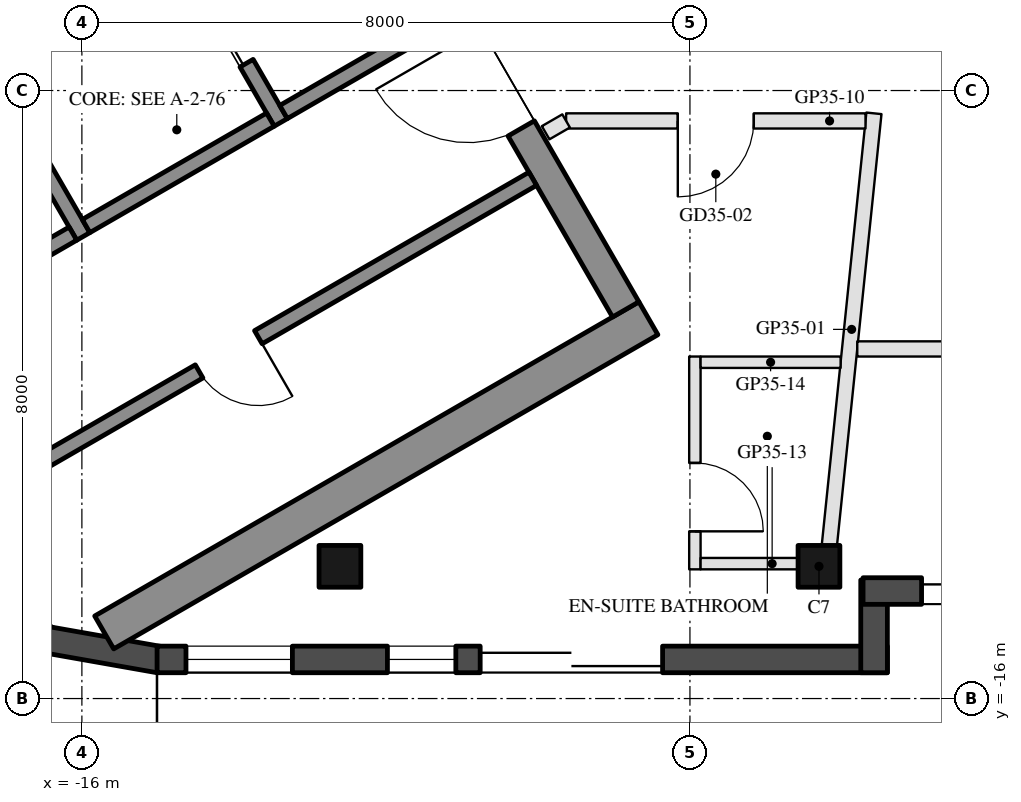
"""IFC4 building model, lengths in metres.
Left out: names, types, materials, properties, quantities, classifications, styles, units other than length and angle.
Written with IfcOpenShell. Run it as: python <this file> out.ifc"""

import sys

from ifc_helpers import new_model, si_unit, direction, frame, frame_2d, origin, origin_2d, place, context, subcontext, project, spatial, rectangle, hollow_rectangle, extrude, boolean, halfspace, element, fill, save


model = new_model("IFC4")
c1 = context("Model", 3, precision=1e-05, world=origin(), true_north=direction((0.0, 1.0)))
c2 = subcontext(c1, "Body", "Model", "MODEL_VIEW")
j1 = project(units=[si_unit("LENGTHUNIT", "METRE"), si_unit("PLANEANGLEUNIT", "RADIAN")], contexts=[c1])
p1 = place(None, origin())
s1 = spatial("IfcSite", under=j1, at=p1, CompositionType="ELEMENT")
p2 = place(p1, origin())
s2 = spatial("IfcBuilding", under=s1, at=p2, CompositionType="ELEMENT")
p3 = place(p2, frame((0.0, 0.0, 324.4)))
s3 = spatial("IfcBuildingStorey", under=s2, at=p3, CompositionType="ELEMENT", Elevation=324.4)
p4 = place(p3, frame((-12.605, -14.26, 0.0), z_axis=(0.0, 0.0, 1.0), x_axis=(-1.0, 0.0, 0.0)))
e1 = element("IfcColumn", 1, at=p4, inside=s3, PredefinedType="COLUMN", context=c2, shape_type="SweptSolid", body=[
    boolean("DIFFERENCE", boolean("DIFFERENCE", extrude(hollow_rectangle(XDim=0.55, YDim=0.55, WallThickness=0.025, at=origin_2d()), origin(), (0.0, 0.0, 1.0), 3.7), halfspace(frame((0.0, 0.0, 0.04), z_axis=(0.0, 0.0, 1.0), x_axis=(1.0, 0.0, 0.0)), True)), halfspace(frame((0.0, 0.0, 3.66), z_axis=(0.0, 0.0, 1.0), x_axis=(1.0, 0.0, 0.0)), False)),
])
p5 = place(p3, frame((-6.302, -14.26, 0.0), z_axis=(0.0, 0.0, 1.0), x_axis=(-1.0, 0.0, 0.0)))
e2 = element("IfcColumn", 2, at=p5, inside=s3, PredefinedType="COLUMN", context=c2, shape_type="SweptSolid", body=[
    boolean("DIFFERENCE", boolean("DIFFERENCE", extrude(hollow_rectangle(XDim=0.55, YDim=0.55, WallThickness=0.025, at=origin_2d()), origin(), (0.0, 0.0, 1.0), 3.7), halfspace(frame((0.0, 0.0, 0.034), z_axis=(0.0, 0.0, 1.0), x_axis=(1.0, 0.0, 0.0)), True)), halfspace(frame((0.0, 0.0, 3.666), z_axis=(0.0, 0.0, 1.0), x_axis=(1.0, 0.0, 0.0)), False)),
])
for number, where, z_axis, x_axis in (
    (3, (-17.744, -14.482, 0.0), (0.0, 0.0, 1.0), (0.866, -0.5, 0.0)),
    (4, (-16.481, -15.223, 0.0), (0.0, 0.0, 1.0), (0.985, -0.174, 0.0)),
):
    element("IfcWall", number, at=place(p3, frame(where, z_axis=z_axis, x_axis=x_axis)), inside=s3, PredefinedType="SOLIDWALL", context=c2, shape_type="SweptSolid", body=[
        extrude(rectangle(XDim=1.524, YDim=0.35, at=frame_2d((0.762, 0.0))), origin(), (0.0, 0.0, 1.0), 3.55),
    ])
p6 = place(p3, frame((-15.011, -15.485, 0.0), z_axis=(0.0, 0.0, 1.0), x_axis=(1.0, 0.0, 0.0)))
e5 = element("IfcWall", 5, at=p6, inside=s3, PredefinedType="SOLIDWALL", context=c2, shape_type="SweptSolid", body=[
    extrude(rectangle(XDim=9.608, YDim=0.35, at=frame_2d((4.804, 0.0))), origin(), (0.0, 0.0, 1.0), 3.55),
])
p7 = place(p6, frame((0.38, 0.0, 0.3)))
e6 = element("IfcOpeningElement", 6, at=p7, cuts=e5, PredefinedType="OPENING", context=c2, shape_type="SweptSolid", body=[
    extrude(rectangle(XDim=1.4, YDim=2.65, at=frame_2d((0.7, 1.325))), frame((0.0, 0.185, 0.0), z_axis=(0.0, -1.0, 0.0), x_axis=(1.0, 0.0, 0.0)), (0.0, 0.0, 1.0), 0.37),
])
p8 = place(p6, frame((4.251, 0.0, 0.0)))
e7 = element("IfcOpeningElement", 7, at=p8, cuts=e5, PredefinedType="OPENING", context=c2, shape_type="SweptSolid", body=[
    extrude(rectangle(XDim=2.4, YDim=2.4, at=frame_2d((1.2, 1.2))), frame((0.0, 0.185, 0.0), z_axis=(0.0, -1.0, 0.0), x_axis=(1.0, 0.0, 0.0)), (0.0, 0.0, 1.0), 0.37),
])
p9 = place(p6, frame((3.031, 0.0, 0.3)))
e8 = element("IfcOpeningElement", 8, at=p9, cuts=e5, PredefinedType="OPENING", context=c2, shape_type="SweptSolid", body=[
    extrude(rectangle(XDim=0.9, YDim=2.65, at=frame_2d((0.45, 1.325))), frame((0.0, 0.185, 0.0), z_axis=(0.0, -1.0, 0.0), x_axis=(1.0, 0.0, 0.0)), (0.0, 0.0, 1.0), 0.37),
])
p10 = place(p3, frame((-5.577, -15.66, 0.0), z_axis=(0.0, 0.0, 1.0), x_axis=(0.0, 1.0, 0.0)))
e9 = element("IfcWall", 9, at=p10, inside=s3, PredefinedType="SOLIDWALL", context=c2, shape_type="SweptSolid", body=[
    extrude(rectangle(XDim=1.22, YDim=0.35, at=frame_2d((0.61, 0.0))), origin(), (0.0, 0.0, 1.0), 3.55),
])
p11 = place(p3, frame((-5.722, -14.585, 0.0), z_axis=(0.0, 0.0, 1.0), x_axis=(1.0, 0.0, 0.0)))
e10 = element("IfcWall", 10, at=p11, inside=s3, PredefinedType="SOLIDWALL", context=c2, shape_type="SweptSolid", body=[
    extrude(rectangle(XDim=5.142, YDim=0.35, at=frame_2d((2.571, 0.0))), origin(), (0.0, 0.0, 1.0), 3.55),
])
p12 = place(p11, frame((0.77, 0.0, 0.0)))
e11 = element("IfcOpeningElement", 11, at=p12, cuts=e10, PredefinedType="OPENING", context=c2, shape_type="SweptSolid", body=[
    extrude(rectangle(XDim=2.4, YDim=2.4, at=frame_2d((1.2, 1.2))), frame((0.0, 0.185, 0.0), z_axis=(0.0, -1.0, 0.0), x_axis=(1.0, 0.0, 0.0)), (0.0, 0.0, 1.0), 0.37),
])
p13 = place(p11, frame((3.47, 0.0, 0.3)))
e12 = element("IfcOpeningElement", 12, at=p13, cuts=e10, PredefinedType="OPENING", context=c2, shape_type="SweptSolid", body=[
    extrude(rectangle(XDim=0.9, YDim=2.65, at=frame_2d((0.45, 1.325))), frame((0.0, 0.185, 0.0), z_axis=(0.0, -1.0, 0.0), x_axis=(1.0, 0.0, 0.0)), (0.0, 0.0, 1.0), 0.37),
])
p14 = place(p3, frame((-8.547, -10.997, 0.0), z_axis=(0.0, 0.0, 1.0), x_axis=(-0.866030186143, -0.49999171662, 0.0)))
e13 = element("IfcWall", 13, at=p14, inside=s3, PredefinedType="SHEAR", context=c2, shape_type="SweptSolid", body=[
    extrude(rectangle(XDim=8.267, YDim=0.5, at=frame_2d((4.134, 0.0))), origin(), (0.0, 0.0, 1.0), 3.5),
])
p15 = place(p3, frame((-13.845, -2.22, 0.0), z_axis=(0.0, 0.0, 1.0), x_axis=(0.500004234368, -0.866022959057, 0.0)))
e14 = element("IfcWall", 14, at=p15, inside=s3, PredefinedType="SHEAR", context=c2, shape_type="SweptSolid", body=[
    extrude(rectangle(XDim=10.0, YDim=0.4, at=frame_2d((5.0, 0.0))), origin(), (0.0, 0.0, 1.0), 3.5),
])
p16 = place(p15, frame((3.55, 0.0, 0.0)))
e15 = element("IfcOpeningElement", 15, at=p16, cuts=e14, PredefinedType="OPENING", context=c2, shape_type="SweptSolid", body=[
    extrude(rectangle(XDim=1.1, YDim=2.1, at=frame_2d((0.55, 1.05))), frame((0.0, 0.21, 0.0), z_axis=(0.0, -1.0, 0.0), x_axis=(1.0, 0.0, 0.0)), (0.0, 0.0, 1.0), 0.42),
])
p17 = place(p15, frame((5.85, 0.0, 0.0)))
e16 = element("IfcOpeningElement", 16, at=p17, cuts=e14, PredefinedType="OPENING", context=c2, shape_type="SweptSolid", body=[
    extrude(rectangle(XDim=1.4, YDim=2.1, at=frame_2d((0.7, 1.05))), frame((0.0, 0.21, 0.0), z_axis=(0.0, -1.0, 0.0), x_axis=(1.0, 0.0, 0.0)), (0.0, 0.0, 1.0), 0.42),
])
p18 = place(p3, frame((-12.681, -4.636, 0.0), z_axis=(0.0, 0.0, 1.0), x_axis=(-0.866021702275, -0.500006411147, 0.0)))
e17 = element("IfcWall", 17, at=p18, inside=s3, PredefinedType="SHEAR", context=c2, shape_type="SweptSolid", body=[
    extrude(rectangle(XDim=6.45, YDim=0.25, at=frame_2d((3.225, 0.0))), origin(), (0.0, 0.0, 1.0), 3.5),
])
p19 = place(p18, frame((0.3, 0.0, 0.0)))
e18 = element("IfcOpeningElement", 18, at=p19, cuts=e17, PredefinedType="OPENING", context=c2, shape_type="SweptSolid", body=[
    extrude(rectangle(XDim=1.0, YDim=2.1, at=frame_2d((0.5, 1.05))), frame((0.0, 0.135, 0.0), z_axis=(0.0, -1.0, 0.0), x_axis=(1.0, 0.0, 0.0)), (0.0, 0.0, 1.0), 0.27),
])
p20 = place(p3, frame((-17.381, -7.495, 0.0), z_axis=(0.0, 0.0, 1.0), x_axis=(0.500011755427, -0.866018616679, 0.0)))
e19 = element("IfcWall", 19, at=p20, inside=s3, PredefinedType="SHEAR", context=c2, shape_type="SweptSolid", body=[
    extrude(rectangle(XDim=2.8, YDim=0.2, at=frame_2d((1.4, 0.0))), origin(), (0.0, 0.0, 1.0), 3.5),
])
p21 = place(p3, frame((-14.783, -5.995, 0.0), z_axis=(0.0, 0.0, 1.0), x_axis=(0.49994636267, -0.866056369097, 0.0)))
e20 = element("IfcWall", 20, at=p21, inside=s3, PredefinedType="SHEAR", context=c2, shape_type="SweptSolid", body=[
    extrude(rectangle(XDim=2.8, YDim=0.2, at=frame_2d((1.4, 0.0))), origin(), (0.0, 0.0, 1.0), 3.5),
])
p22 = place(p21, frame((0.7, 0.0, 0.0)))
e21 = element("IfcOpeningElement", 21, at=p22, cuts=e20, PredefinedType="OPENING", context=c2, shape_type="SweptSolid", body=[
    extrude(rectangle(XDim=1.2, YDim=2.1, at=frame_2d((0.6, 1.05))), frame((0.0, 0.11, 0.0), z_axis=(0.0, -1.0, 0.0), x_axis=(1.0, 0.0, 0.0)), (0.0, 0.0, 1.0), 0.22),
])
p23 = place(p3, frame((-13.52, -8.383, 0.0), z_axis=(0.0, 0.0, 1.0), x_axis=(-0.866034573852, -0.49998411664, 0.0)))
e22 = element("IfcWall", 22, at=p23, inside=s3, PredefinedType="SHEAR", context=c2, shape_type="SweptSolid", body=[
    extrude(rectangle(XDim=2.8, YDim=0.2, at=frame_2d((1.4, 0.0))), origin(), (0.0, 0.0, 1.0), 3.5),
])
p24 = place(p3, frame((-11.268, -7.083, 0.0), z_axis=(0.0, 0.0, 1.0), x_axis=(-0.866050077142, -0.499957262057, 0.0)))
e23 = element("IfcWall", 23, at=p24, inside=s3, PredefinedType="SHEAR", context=c2, shape_type="SweptSolid", body=[
    extrude(rectangle(XDim=2.4, YDim=0.2, at=frame_2d((1.2, 0.0))), origin(), (0.0, 0.0, 1.0), 3.5),
])
p25 = place(p3, frame((-10.068, -9.162, 0.0), z_axis=(0.0, 0.0, 1.0), x_axis=(-0.866027741594, -0.499995950774, 0.0)))
e24 = element("IfcWall", 24, at=p25, inside=s3, PredefinedType="SHEAR", context=c2, shape_type="SweptSolid", body=[
    extrude(rectangle(XDim=9.272, YDim=0.2, at=frame_2d((4.636, 0.0))), origin(), (0.0, 0.0, 1.0), 3.5),
])
p26 = place(p25, frame((4.169, 0.0, 0.0)))
e25 = element("IfcOpeningElement", 25, at=p26, cuts=e24, PredefinedType="OPENING", context=c2, shape_type="SweptSolid", body=[
    extrude(rectangle(XDim=0.9, YDim=2.1, at=frame_2d((0.45, 1.05))), frame((0.0, 0.11, 0.0), z_axis=(0.0, -1.0, 0.0), x_axis=(1.0, 0.0, 0.0)), (0.0, 0.0, 1.0), 0.22),
])
p27 = place(p3, frame((-16.118, -9.883, 0.0), z_axis=(0.0, 0.0, 1.0), x_axis=(-0.86600680221, -0.500032217487, 0.0)))
e26 = element("IfcWall", 26, at=p27, inside=s3, PredefinedType="SHEAR", context=c2, shape_type="SweptSolid", body=[
    extrude(rectangle(XDim=1.774, YDim=0.2, at=frame_2d((0.887, 0.0))), origin(), (0.0, 0.0, 1.0), 3.5),
])
p28 = place(p3, frame((-6.166, -13.985, 0.0), z_axis=(0.0, 0.0, 1.0), x_axis=(0.102603302072, 0.994722354431, 0.0)))
e27 = element("IfcWall", 27, at=p28, inside=s3, PredefinedType="PARTITIONING", context=c2, shape_type="SweptSolid", body=[
    extrude(rectangle(XDim=5.716, YDim=0.2, at=frame_2d((2.858, 0.0))), origin(), (0.0, 0.0, 1.0), 3.1),
])
p29 = place(p3, frame((-5.69, -8.4, 0.0), z_axis=(0.0, 0.0, 1.0), x_axis=(-1.0, 0.0, 0.0)))
e28 = element("IfcWall", 28, at=p29, inside=s3, PredefinedType="PARTITIONING", context=c2, shape_type="SweptSolid", body=[
    extrude(rectangle(XDim=3.939, YDim=0.2, at=frame_2d((1.969, 0.0))), origin(), (0.0, 0.0, 1.0), 3.15),
])
p30 = place(p29, frame((1.469, 0.0, 0.0)))
e29 = element("IfcOpeningElement", 29, at=p30, cuts=e28, PredefinedType="OPENING", context=c2, shape_type="SweptSolid", body=[
    extrude(rectangle(XDim=1.0, YDim=2.1, at=frame_2d((0.5, 1.05))), frame((0.0, 0.11, 0.0), z_axis=(0.0, -1.0, 0.0), x_axis=(1.0, 0.0, 0.0)), (0.0, 0.0, 1.0), 0.22),
])
p31 = place(p3, frame((-9.629, -8.4, 0.0), z_axis=(0.0, 0.0, 1.0), x_axis=(-0.865963302823, -0.500107546598, 0.0)))
e30 = element("IfcWall", 30, at=p31, inside=s3, PredefinedType="PARTITIONING", context=c2, shape_type="SweptSolid", body=[
    extrude(rectangle(XDim=0.311, YDim=0.2, at=frame_2d((0.156, 0.0))), origin(), (0.0, 0.0, 1.0), 3.55),
])
p32 = place(p3, frame((-7.935, -11.5, 0.0), z_axis=(0.0, 0.0, 1.0), x_axis=(0.0, -1.0, 0.0)))
e31 = element("IfcWall", 31, at=p32, inside=s3, PredefinedType="PARTITIONING", context=c2, shape_type="SweptSolid", body=[
    extrude(rectangle(XDim=2.8, YDim=0.15, at=frame_2d((1.4, 0.0))), origin(), (0.0, 0.0, 1.0), 3.1),
])
p33 = place(p32, frame((1.4, 0.0, 0.0)))
e32 = element("IfcOpeningElement", 32, at=p33, cuts=e31, PredefinedType="OPENING", context=c2, shape_type="SweptSolid", body=[
    extrude(rectangle(XDim=0.9, YDim=2.1, at=frame_2d((0.45, 1.05))), frame((0.0, 0.085, 0.0), z_axis=(0.0, -1.0, 0.0), x_axis=(1.0, 0.0, 0.0)), (0.0, 0.0, 1.0), 0.17),
])
p34 = place(p3, frame((-7.86, -14.225, 0.0), z_axis=(0.0, 0.0, 1.0), x_axis=(1.0, 0.0, 0.0)))
e33 = element("IfcWall", 33, at=p34, inside=s3, PredefinedType="PARTITIONING", context=c2, shape_type="SweptSolid", body=[
    extrude(rectangle(XDim=1.569, YDim=0.15, at=frame_2d((0.785, 0.0))), origin(), (0.0, 0.0, 1.0), 3.1),
])
p35 = place(p3, frame((-7.86, -11.575, 0.0), z_axis=(0.0, 0.0, 1.0), x_axis=(1.0, 0.0, 0.0)))
e34 = element("IfcWall", 34, at=p35, inside=s3, PredefinedType="PARTITIONING", context=c2, shape_type="SweptSolid", body=[
    extrude(rectangle(XDim=1.843, YDim=0.15, at=frame_2d((0.921, 0.0))), origin(), (0.0, 0.0, 1.0), 3.15),
])
p36 = place(p3, frame((0.015, -11.4, 0.0), z_axis=(0.0, 0.0, 1.0), x_axis=(-1.0, 0.0, 0.0)))
e35 = element("IfcWall", 35, at=p36, inside=s3, PredefinedType="PARTITIONING", context=c2, shape_type="SweptSolid", body=[
    extrude(rectangle(XDim=5.813, YDim=0.2, at=frame_2d((2.907, 0.0))), origin(), (0.0, 0.0, 1.0), 3.15),
])
p37 = place(p36, frame((2.407, 0.0, 0.0)))
e36 = element("IfcOpeningElement", 36, at=p37, cuts=e35, PredefinedType="OPENING", context=c2, shape_type="SweptSolid", body=[
    extrude(rectangle(XDim=1.0, YDim=2.1, at=frame_2d((0.5, 1.05))), frame((0.0, 0.11, 0.0), z_axis=(0.0, -1.0, 0.0), x_axis=(1.0, 0.0, 0.0)), (0.0, 0.0, 1.0), 0.22),
])
p38 = place(p7, origin())
e37 = element("IfcWindow", 37, at=p38, inside=s3, PartitioningType="SINGLE_PANEL", PredefinedType="WINDOW", context=c2, shape_type="SweptSolid", body=[
    extrude(rectangle(XDim=1.4, YDim=2.65, at=frame_2d((0.7, 1.325))), frame((0.0, 0.03, 0.0), z_axis=(0.0, -1.0, 0.0), x_axis=(1.0, 0.0, 0.0)), (0.0, 0.0, 1.0), 0.06),
])
fill(e6, e37)
p39 = place(p8, frame((2.4, 0.0, 0.0), z_axis=(0.0, 0.0, 1.0), x_axis=(-1.0, 0.0, 0.0)))
e38 = element("IfcDoor", 38, at=p39, inside=s3, OperationType="SLIDING_TO_LEFT", PredefinedType="DOOR", context=c2, shape_type="SweptSolid", body=[
    extrude(rectangle(XDim=2.4, YDim=2.4, at=frame_2d((1.2, 1.2))), frame((0.0, 0.025, 0.0), z_axis=(0.0, -1.0, 0.0), x_axis=(1.0, 0.0, 0.0)), (0.0, 0.0, 1.0), 0.05),
])
fill(e7, e38)
p40 = place(p9, origin())
e39 = element("IfcWindow", 39, at=p40, inside=s3, PartitioningType="SINGLE_PANEL", PredefinedType="WINDOW", context=c2, shape_type="SweptSolid", body=[
    extrude(rectangle(XDim=0.9, YDim=2.65, at=frame_2d((0.45, 1.325))), frame((0.0, 0.03, 0.0), z_axis=(0.0, -1.0, 0.0), x_axis=(1.0, 0.0, 0.0)), (0.0, 0.0, 1.0), 0.06),
])
fill(e8, e39)
p41 = place(p12, frame((2.4, 0.0, 0.0), z_axis=(0.0, 0.0, 1.0), x_axis=(-1.0, 0.0, 0.0)))
e40 = element("IfcDoor", 40, at=p41, inside=s3, OperationType="SLIDING_TO_LEFT", PredefinedType="DOOR", context=c2, shape_type="SweptSolid", body=[
    extrude(rectangle(XDim=2.4, YDim=2.4, at=frame_2d((1.2, 1.2))), frame((0.0, 0.025, 0.0), z_axis=(0.0, -1.0, 0.0), x_axis=(1.0, 0.0, 0.0)), (0.0, 0.0, 1.0), 0.05),
])
fill(e11, e40)
p42 = place(p22, origin())
e41 = element("IfcDoor", 41, at=p42, inside=s3, OperationType="DOUBLE_DOOR_SLIDING", PredefinedType="DOOR", context=c2, shape_type="SweptSolid", body=[
    extrude(rectangle(XDim=1.2, YDim=2.1, at=frame_2d((0.6, 1.05))), frame((0.0, 0.025, 0.0), z_axis=(0.0, -1.0, 0.0), x_axis=(1.0, 0.0, 0.0)), (0.0, 0.0, 1.0), 0.05),
])
fill(e21, e41)
p43 = place(p26, origin())
e42 = element("IfcDoor", 42, at=p43, inside=s3, OperationType="SINGLE_SWING_LEFT", PredefinedType="DOOR", context=c2, shape_type="SweptSolid", body=[
    extrude(rectangle(XDim=0.9, YDim=2.1, at=frame_2d((0.45, 1.05))), frame((0.0, 0.025, 0.0), z_axis=(0.0, -1.0, 0.0), x_axis=(1.0, 0.0, 0.0)), (0.0, 0.0, 1.0), 0.05),
])
fill(e25, e42)
p44 = place(p17, frame((1.4, 0.0, 0.0), z_axis=(0.0, 0.0, 1.0), x_axis=(-1.0, 0.0, 0.0)))
e43 = element("IfcDoor", 43, at=p44, inside=s3, OperationType="DOUBLE_DOOR_SINGLE_SWING", PredefinedType="DOOR", context=c2, shape_type="SweptSolid", body=[
    extrude(rectangle(XDim=1.4, YDim=2.1, at=frame_2d((0.7, 1.05))), frame((0.0, 0.025, 0.0), z_axis=(0.0, -1.0, 0.0), x_axis=(1.0, 0.0, 0.0)), (0.0, 0.0, 1.0), 0.05),
])
fill(e16, e43)
p45 = place(p33, origin())
e44 = element("IfcDoor", 44, at=p45, inside=s3, OperationType="SINGLE_SWING_RIGHT", PredefinedType="DOOR", context=c2, shape_type="SweptSolid", body=[
    extrude(rectangle(XDim=0.9, YDim=2.1, at=frame_2d((0.45, 1.05))), frame((0.0, 0.025, 0.0), z_axis=(0.0, -1.0, 0.0), x_axis=(1.0, 0.0, 0.0)), (0.0, 0.0, 1.0), 0.05),
])
fill(e32, e44)
p46 = place(p30, origin())
e45 = element("IfcDoor", 45, at=p46, inside=s3, OperationType="SINGLE_SWING_RIGHT", PredefinedType="DOOR", context=c2, shape_type="SweptSolid", body=[
    extrude(rectangle(XDim=1.0, YDim=2.1, at=frame_2d((0.5, 1.05))), frame((0.0, 0.025, 0.0), z_axis=(0.0, -1.0, 0.0), x_axis=(1.0, 0.0, 0.0)), (0.0, 0.0, 1.0), 0.05),
])
fill(e29, e45)
save(model, sys.argv[1])
